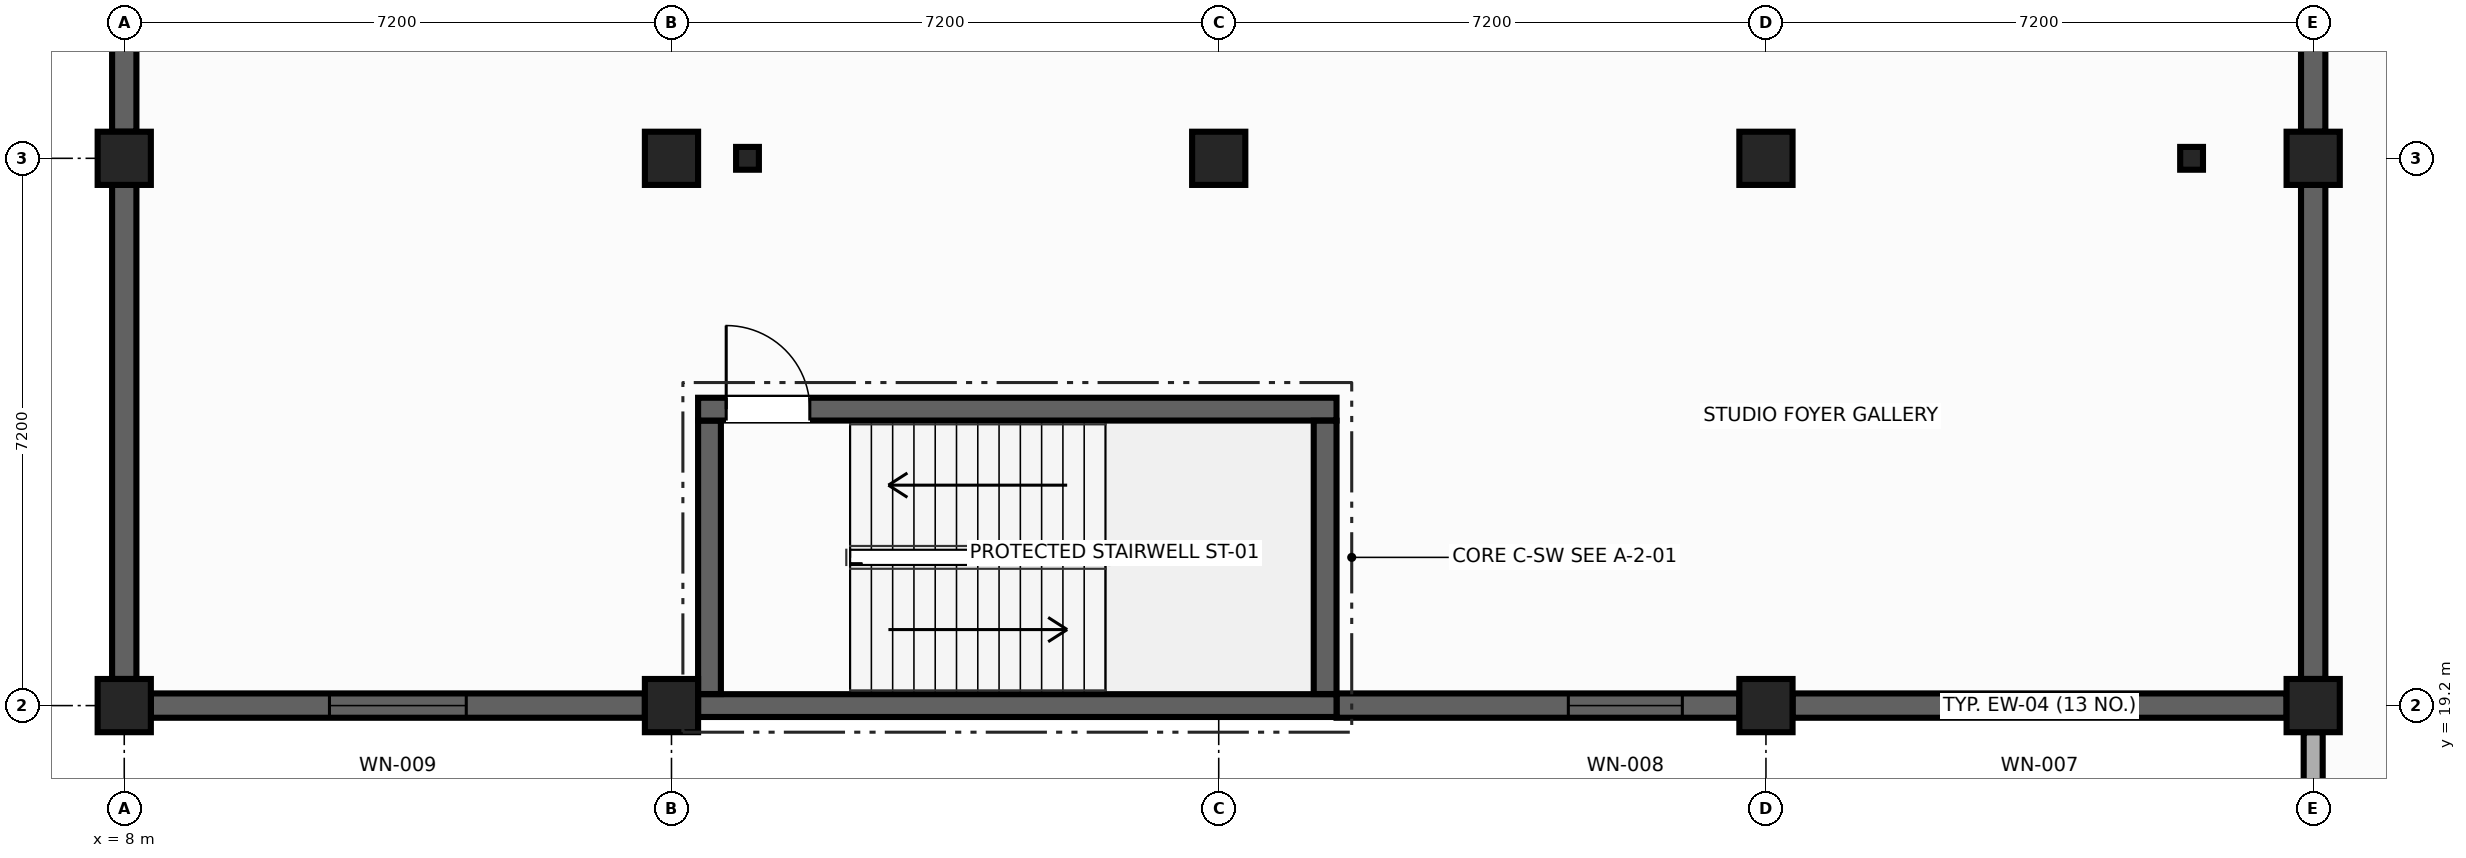
"""IFC4 building model, lengths in metres.
Left out: names, types, materials, properties, quantities, classifications, styles, units other than length and angle.
Written with IfcOpenShell. Run it as: python <this file> out.ifc"""

import sys

from ifc_helpers import new_model, si_unit, direction, frame, frame_2d, origin, origin_2d, place, context, subcontext, project, spatial, rectangle, i_section, extrude, element, fill, save


model = new_model("IFC4")
c1 = context("Model", 3, precision=1e-05, world=origin(), true_north=direction((0.0, 1.0)))
c2 = subcontext(c1, "Body", "Model", "MODEL_VIEW")
j1 = project(units=[si_unit("LENGTHUNIT", "METRE"), si_unit("PLANEANGLEUNIT", "RADIAN")], contexts=[c1])
p1 = place(None, origin())
s1 = spatial("IfcSite", under=j1, at=p1, CompositionType="ELEMENT")
p2 = place(p1, origin())
s2 = spatial("IfcBuilding", under=s1, at=p2, CompositionType="ELEMENT")
p3 = place(p2, frame((0.0, 0.0, 5.4)))
s3 = spatial("IfcBuildingStorey", under=s2, at=p3, CompositionType="ELEMENT", Elevation=5.4)
for number, where, z_axis, x_axis in (
    (1, (16.2, 26.4, 0.0), (0.0, 0.0, 1.0), (1.0, 0.0, 0.0)),
    (2, (35.2, 26.4, 0.0), (0.0, 0.0, 1.0), (1.0, 0.0, 0.0)),
):
    element("IfcColumn", number, at=place(p3, frame(where, z_axis=z_axis, x_axis=x_axis)), inside=s3, PredefinedType="COLUMN", context=c2, shape_type="SweptSolid", body=[
        extrude(i_section(OverallWidth=0.3, OverallDepth=0.3, WebThickness=0.011, FlangeThickness=0.019, at=origin_2d()), origin(), (0.0, 0.0, 1.0), 0.36),
    ])
for number, where, z_axis, x_axis in (
    (3, (8.0, 19.2, 0.0), (0.0, 0.0, 1.0), (0.0, 1.0, 0.0)),
    (4, (15.2, 19.2, 0.0), (0.0, 0.0, 1.0), (1.0, 0.0, 0.0)),
    (5, (29.6, 19.2, 0.0), (0.0, 0.0, 1.0), (1.0, 0.0, 0.0)),
    (6, (36.8, 19.2, 0.0), (0.0, 0.0, 1.0), (1.0, 0.0, 0.0)),
    (7, (8.0, 26.4, 0.0), (0.0, 0.0, 1.0), (1.0, 0.0, 0.0)),
    (8, (15.2, 26.4, 0.0), (0.0, 0.0, 1.0), (0.0, 1.0, 0.0)),
    (9, (22.4, 26.4, 0.0), (0.0, 0.0, 1.0), (1.0, 0.0, 0.0)),
    (10, (29.6, 26.4, 0.0), (0.0, 0.0, 1.0), (1.0, 0.0, 0.0)),
    (11, (36.8, 26.4, 0.0), (0.0, 0.0, 1.0), (0.0, 1.0, 0.0)),
):
    element("IfcColumn", number, at=place(p3, frame(where, z_axis=z_axis, x_axis=x_axis)), inside=s3, PredefinedType="COLUMN", context=c2, shape_type="SweptSolid", body=[
        extrude(rectangle(XDim=0.7, YDim=0.7, at=origin_2d()), origin(), (0.0, 0.0, 1.0), 4.5),
    ])
p4 = place(p3, frame((36.45, 19.2, 0.0), z_axis=(0.0, 0.0, 1.0), x_axis=(-1.0, 0.0, 0.0)))
e12 = element("IfcWall", 12, at=p4, inside=s3, PredefinedType="SOLIDWALL", context=c2, shape_type="SweptSolid", body=[
    extrude(rectangle(XDim=6.5, YDim=0.32, at=frame_2d((3.25, 0.0))), origin(), (0.0, 0.0, 1.0), 4.25),
])
p5 = place(p4, frame((2.05, 0.0, 0.9)))
e13 = element("IfcOpeningElement", 13, at=p5, cuts=e12, PredefinedType="OPENING", context=c2, shape_type="SweptSolid", body=[
    extrude(rectangle(XDim=2.4, YDim=1.8, at=frame_2d((1.2, 0.9))), frame((0.0, 0.17, 0.0), z_axis=(0.0, -1.0, 0.0), x_axis=(1.0, 0.0, 0.0)), (0.0, 0.0, 1.0), 0.34),
])
p6 = place(p3, frame((29.25, 19.2, 0.0), z_axis=(0.0, 0.0, 1.0), x_axis=(-1.0, 0.0, 0.0)))
e14 = element("IfcWall", 14, at=p6, inside=s3, PredefinedType="SOLIDWALL", context=c2, shape_type="SweptSolid", body=[
    extrude(rectangle(XDim=5.3, YDim=0.32, at=frame_2d((2.65, 0.0))), origin(), (0.0, 0.0, 1.0), 4.25),
])
p7 = place(p6, frame((0.75, 0.0, 0.9)))
e15 = element("IfcOpeningElement", 15, at=p7, cuts=e14, PredefinedType="OPENING", context=c2, shape_type="SweptSolid", body=[
    extrude(rectangle(XDim=1.5, YDim=2.1, at=frame_2d((0.75, 1.05))), frame((0.0, 0.17, 0.0), z_axis=(0.0, -1.0, 0.0), x_axis=(1.0, 0.0, 0.0)), (0.0, 0.0, 1.0), 0.34),
])
p8 = place(p3, frame((14.85, 19.2, 0.0), z_axis=(0.0, 0.0, 1.0), x_axis=(-1.0, 0.0, 0.0)))
e16 = element("IfcWall", 16, at=p8, inside=s3, PredefinedType="SOLIDWALL", context=c2, shape_type="SweptSolid", body=[
    extrude(rectangle(XDim=6.5, YDim=0.32, at=frame_2d((3.25, 0.0))), origin(), (0.0, 0.0, 1.0), 4.25),
])
p9 = place(p8, frame((2.35, 0.0, 0.9)))
e17 = element("IfcOpeningElement", 17, at=p9, cuts=e16, PredefinedType="OPENING", context=c2, shape_type="SweptSolid", body=[
    extrude(rectangle(XDim=1.8, YDim=2.1, at=frame_2d((0.9, 1.05))), frame((0.0, 0.17, 0.0), z_axis=(0.0, -1.0, 0.0), x_axis=(1.0, 0.0, 0.0)), (0.0, 0.0, 1.0), 0.34),
])
for number, where, z_axis, x_axis in (
    (18, (8.0, 19.55, 0.0), (0.0, 0.0, 1.0), (0.0, 1.0, 0.0)),
    (19, (8.0, 26.75, 0.0), (0.0, 0.0, 1.0), (0.0, 1.0, 0.0)),
):
    element("IfcWall", number, at=place(p3, frame(where, z_axis=z_axis, x_axis=x_axis)), inside=s3, PredefinedType="SOLIDWALL", context=c2, shape_type="SweptSolid", body=[
        extrude(rectangle(XDim=6.5, YDim=0.32, at=frame_2d((3.25, 0.0))), origin(), (0.0, 0.0, 1.0), 4.25),
    ])
for number, where, z_axis, x_axis in (
    (20, (36.8, 33.25, 0.0), (0.0, 0.0, 1.0), (0.0, -1.0, 0.0)),
    (21, (36.8, 26.05, 0.0), (0.0, 0.0, 1.0), (0.0, -1.0, 0.0)),
):
    element("IfcWall", number, at=place(p3, frame(where, z_axis=z_axis, x_axis=x_axis)), inside=s3, PredefinedType="SOLIDWALL", context=c2, shape_type="SweptSolid", body=[
        extrude(rectangle(XDim=6.5, YDim=0.32, at=frame_2d((3.25, 0.0))), origin(), (0.0, 0.0, 1.0), 4.22),
    ])
p10 = place(p3, frame((36.8, 17.25, 0.0), z_axis=(0.0, 0.0, 1.0), x_axis=(0.0, 1.0, 0.0)))
e22 = element("IfcWall", 22, at=p10, inside=s3, PredefinedType="SOLIDWALL", context=c2, shape_type="SweptSolid", body=[
    extrude(rectangle(XDim=1.6, YDim=0.25, at=frame_2d((0.8, 0.0))), origin(), (0.0, 0.0, 1.0), 3.375),
])
p11 = place(p3, frame((23.95, 19.2, 0.0), z_axis=(0.0, 0.0, 1.0), x_axis=(-1.0, 0.0, 0.0)))
e23 = element("IfcWall", 23, at=p11, inside=s3, PredefinedType="SHEAR", context=c2, shape_type="SweptSolid", body=[
    extrude(rectangle(XDim=8.4, YDim=0.3, at=frame_2d((4.2, 0.0))), origin(), (0.0, 0.0, 1.0), 4.25),
])
p12 = place(p3, frame((15.7, 19.352, 0.0), z_axis=(0.0, 0.0, 1.0), x_axis=(0.0, 1.0, 0.0)))
e24 = element("IfcWall", 24, at=p12, inside=s3, PredefinedType="SHEAR", context=c2, shape_type="SweptSolid", body=[
    extrude(rectangle(XDim=3.598, YDim=0.3, at=frame_2d((1.799, 0.0))), origin(), (0.0, 0.0, 1.0), 4.25),
])
p13 = place(p3, frame((15.55, 23.1, 0.0), z_axis=(0.0, 0.0, 1.0), x_axis=(1.0, 0.0, 0.0)))
e25 = element("IfcWall", 25, at=p13, inside=s3, PredefinedType="SHEAR", context=c2, shape_type="SweptSolid", body=[
    extrude(rectangle(XDim=8.4, YDim=0.3, at=frame_2d((4.2, 0.0))), origin(), (0.0, 0.0, 1.0), 4.25),
])
p14 = place(p13, frame((0.37, 0.0, 0.0)))
e26 = element("IfcOpeningElement", 26, at=p14, cuts=e25, PredefinedType="OPENING", context=c2, shape_type="SweptSolid", body=[
    extrude(rectangle(XDim=1.1, YDim=2.15, at=frame_2d((0.55, 1.075))), frame((0.0, 0.16, 0.0), z_axis=(0.0, -1.0, 0.0), x_axis=(1.0, 0.0, 0.0)), (0.0, 0.0, 1.0), 0.32),
])
p15 = place(p3, frame((23.8, 22.948, 0.0), z_axis=(0.0, 0.0, 1.0), x_axis=(0.0, -1.0, 0.0)))
e27 = element("IfcWall", 27, at=p15, inside=s3, PredefinedType="SHEAR", context=c2, shape_type="SweptSolid", body=[
    extrude(rectangle(XDim=3.596, YDim=0.3, at=frame_2d((1.798, 0.0))), origin(), (0.0, 0.0, 1.0), 4.25),
])
p16 = place(p5, origin())
e28 = element("IfcWindow", 28, at=p16, inside=s3, PartitioningType="SINGLE_PANEL", PredefinedType="WINDOW", context=c2, shape_type="SweptSolid", body=[
    extrude(rectangle(XDim=2.4, YDim=1.8, at=frame_2d((1.2, 0.9))), frame((0.0, 0.03, 0.0), z_axis=(0.0, -1.0, 0.0), x_axis=(1.0, 0.0, 0.0)), (0.0, 0.0, 1.0), 0.06),
])
fill(e13, e28)
p17 = place(p7, origin())
e29 = element("IfcWindow", 29, at=p17, inside=s3, PartitioningType="SINGLE_PANEL", PredefinedType="WINDOW", context=c2, shape_type="SweptSolid", body=[
    extrude(rectangle(XDim=1.5, YDim=2.1, at=frame_2d((0.75, 1.05))), frame((0.0, 0.03, 0.0), z_axis=(0.0, -1.0, 0.0), x_axis=(1.0, 0.0, 0.0)), (0.0, 0.0, 1.0), 0.06),
])
fill(e15, e29)
p18 = place(p9, origin())
e30 = element("IfcWindow", 30, at=p18, inside=s3, PartitioningType="SINGLE_PANEL", PredefinedType="WINDOW", context=c2, shape_type="SweptSolid", body=[
    extrude(rectangle(XDim=1.8, YDim=2.1, at=frame_2d((0.9, 1.05))), frame((0.0, 0.03, 0.0), z_axis=(0.0, -1.0, 0.0), x_axis=(1.0, 0.0, 0.0)), (0.0, 0.0, 1.0), 0.06),
])
fill(e17, e30)
p19 = place(p14, origin())
e31 = element("IfcDoor", 31, at=p19, inside=s3, OperationType="SINGLE_SWING_LEFT", PredefinedType="DOOR", context=c2, shape_type="SweptSolid", body=[
    extrude(rectangle(XDim=1.1, YDim=2.15, at=frame_2d((0.55, 1.075))), frame((0.0, 0.025, 0.0), z_axis=(0.0, -1.0, 0.0), x_axis=(1.0, 0.0, 0.0)), (0.0, 0.0, 1.0), 0.05),
])
fill(e26, e31)
save(model, sys.argv[1])
